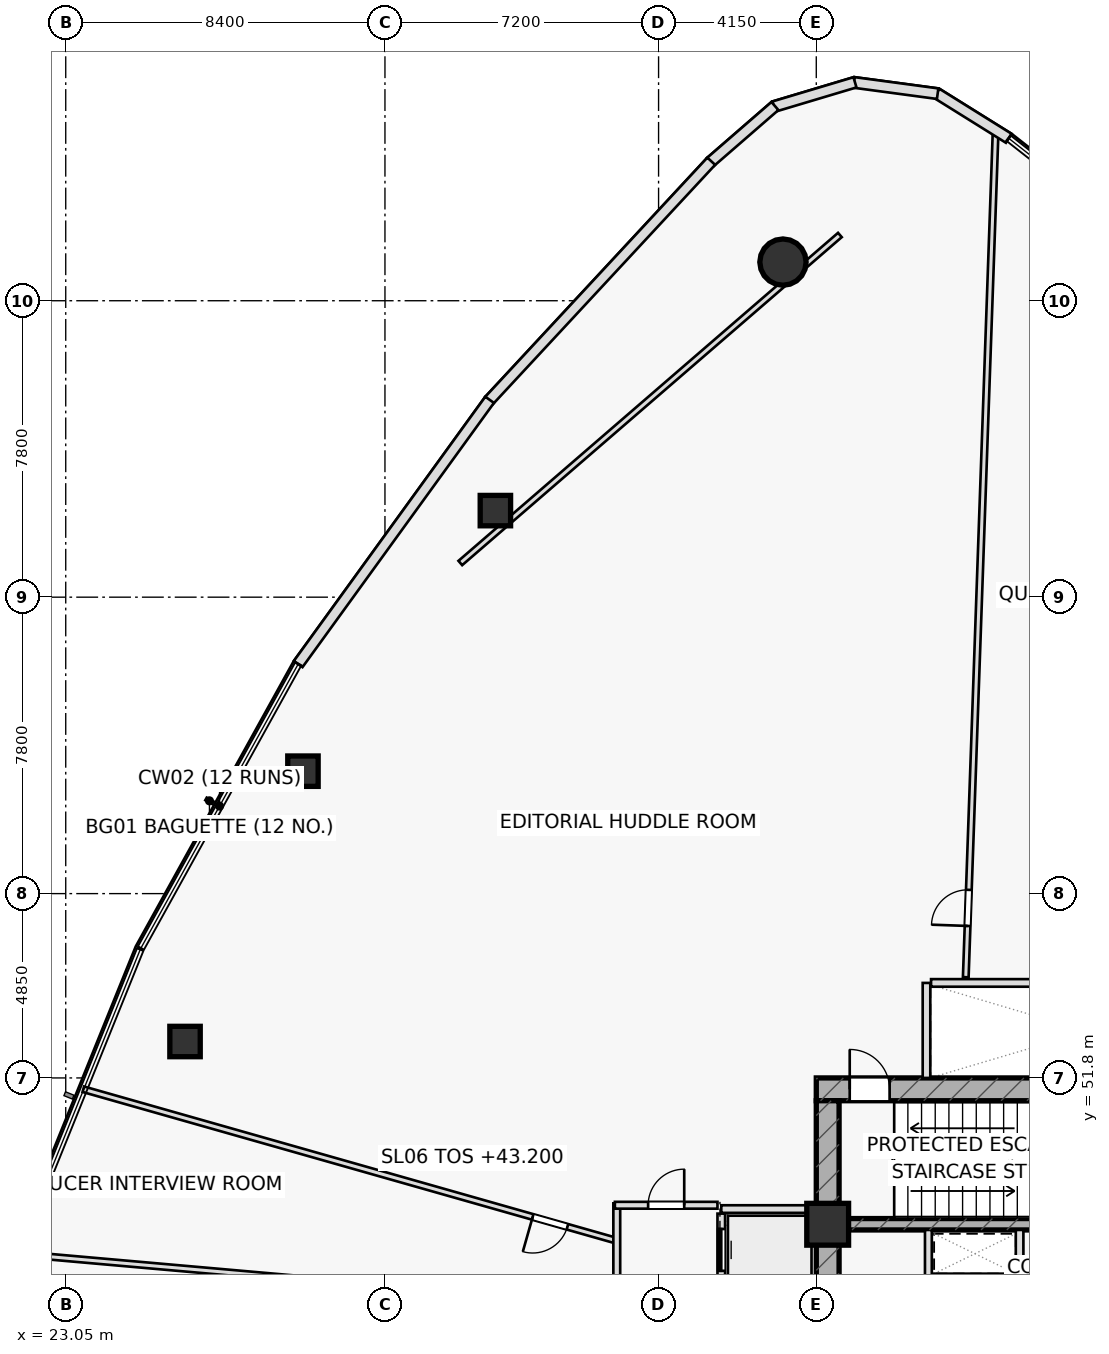
"""IFC4 building model, lengths in metres.
Left out: names, types, materials, properties, quantities, classifications, styles, units other than length and angle.
Written with IfcOpenShell. Run it as: python <this file> out.ifc"""

import sys

from ifc_helpers import new_model, si_unit, direction, frame, frame_2d, origin, origin_2d, place, context, subcontext, project, spatial, rectangle, hollow_rectangle, hollow_circle, extrude, element, fill, save


model = new_model("IFC4")
c1 = context("Model", 3, precision=1e-05, world=origin(), true_north=direction((0.0, 1.0)))
c2 = subcontext(c1, "Body", "Model", "MODEL_VIEW")
j1 = project(units=[si_unit("LENGTHUNIT", "METRE"), si_unit("PLANEANGLEUNIT", "RADIAN")], contexts=[c1])
p1 = place(None, origin())
s1 = spatial("IfcSite", under=j1, at=p1, CompositionType="ELEMENT")
p2 = place(p1, origin())
s2 = spatial("IfcBuilding", under=s1, at=p2, CompositionType="ELEMENT")
p3 = place(p2, frame((0.0, 0.0, 43.2)))
s3 = spatial("IfcBuildingStorey", under=s2, at=p3, CompositionType="ELEMENT", Elevation=43.2)
p4 = place(p3, frame((42.8, 51.5, 0.0), z_axis=(0.0, 0.0, 1.0), x_axis=(1.0, 0.0, 0.0)))
e1 = element("IfcWall", 1, at=p4, inside=s3, PredefinedType="SHEAR", context=c2, shape_type="SweptSolid", body=[
    extrude(rectangle(XDim=14.4, YDim=0.6, at=frame_2d((7.2, 0.0))), origin(), (0.0, 0.0, 1.0), 3.6),
])
p5 = place(p4, frame((0.88, 0.0, 0.0)))
e2 = element("IfcOpeningElement", 2, at=p5, cuts=e1, PredefinedType="OPENING", context=c2, shape_type="SweptSolid", body=[
    extrude(rectangle(XDim=1.05, YDim=2.2, at=frame_2d((0.525, 1.1))), frame((0.0, 0.31, 0.0), z_axis=(0.0, -1.0, 0.0), x_axis=(1.0, 0.0, 0.0)), (0.0, 0.0, 1.0), 0.62),
])
p6 = place(p3, frame((43.1, 38.8, 0.0), z_axis=(0.0, 0.0, 1.0), x_axis=(0.0, 1.0, 0.0)))
e3 = element("IfcWall", 3, at=p6, inside=s3, PredefinedType="SHEAR", context=c2, shape_type="SweptSolid", body=[
    extrude(rectangle(XDim=12.4, YDim=0.6, at=frame_2d((6.2, 0.0))), origin(), (0.0, 0.0, 1.0), 3.6),
])
p7 = place(p3, frame((43.4, 47.95, 0.0), z_axis=(0.0, 0.0, 1.0), x_axis=(1.0, 0.0, 0.0)))
e4 = element("IfcWall", 4, at=p7, inside=s3, PredefinedType="SHEAR", context=c2, shape_type="SweptSolid", body=[
    extrude(rectangle(XDim=13.2, YDim=0.3, at=frame_2d((6.6, 0.0))), origin(), (0.0, 0.0, 1.0), 3.6),
])
p8 = place(p7, frame((8.345, 0.0, 0.0)))
e5 = element("IfcOpeningElement", 5, at=p8, cuts=e4, PredefinedType="OPENING", context=c2, shape_type="SweptSolid", body=[
    extrude(rectangle(XDim=1.15, YDim=2.2, at=frame_2d((0.575, 1.1))), frame((0.0, 0.16, 0.0), z_axis=(0.0, -1.0, 0.0), x_axis=(1.0, 0.0, 0.0)), (0.0, 0.0, 1.0), 0.32),
])
p9 = place(p7, frame((10.065, 0.0, 0.0)))
e6 = element("IfcOpeningElement", 6, at=p9, cuts=e4, PredefinedType="OPENING", context=c2, shape_type="SweptSolid", body=[
    extrude(rectangle(XDim=1.15, YDim=2.2, at=frame_2d((0.575, 1.1))), frame((0.0, 0.16, 0.0), z_axis=(0.0, -1.0, 0.0), x_axis=(1.0, 0.0, 0.0)), (0.0, 0.0, 1.0), 0.32),
])
p10 = place(p7, frame((11.645, 0.0, 0.0)))
e7 = element("IfcOpeningElement", 7, at=p10, cuts=e4, PredefinedType="OPENING", context=c2, shape_type="SweptSolid", body=[
    extrude(rectangle(XDim=1.15, YDim=2.2, at=frame_2d((0.575, 1.1))), frame((0.0, 0.16, 0.0), z_axis=(0.0, -1.0, 0.0), x_axis=(1.0, 0.0, 0.0)), (0.0, 0.0, 1.0), 0.32),
])
p11 = place(p3, frame((43.1, 47.95, 0.0), z_axis=(0.0, 0.0, 1.0), x_axis=(1.0, 0.0, 0.0)))
e8 = element("IfcColumn", 8, at=p11, inside=s3, PredefinedType="COLUMN", context=c2, shape_type="SweptSolid", body=[
    extrude(rectangle(XDim=1.1, YDim=1.1, at=origin_2d()), origin(), (0.0, 0.0, 1.0), 3.6),
])
p12 = place(p3, frame((41.923, 73.266, 0.0), z_axis=(0.0, 0.0, 1.0), x_axis=(1.0, 0.0, 0.0)))
e9 = element("IfcColumn", 9, at=p12, inside=s3, PredefinedType="COLUMN", context=c2, shape_type="SweptSolid", body=[
    extrude(hollow_circle(Radius=0.61, WallThickness=0.05, at=origin_2d()), origin(), (0.0, 0.0, 1.0), 3.6),
])
for number, where, z_axis, x_axis in (
    (10, (34.356, 66.728, 0.0), (0.0, 0.0, 1.0), (1.0, 0.0, 0.0)),
    (11, (29.292, 59.872, 0.0), (0.0, 0.0, 1.0), (1.0, 0.0, 0.0)),
    (12, (26.189, 52.758, 0.0), (0.0, 0.0, 1.0), (1.0, 0.0, 0.0)),
):
    element("IfcColumn", number, at=place(p3, frame(where, z_axis=z_axis, x_axis=x_axis)), inside=s3, PredefinedType="COLUMN", context=c2, shape_type="SweptSolid", body=[
        extrude(hollow_rectangle(XDim=0.8, YDim=0.8, WallThickness=0.045, at=origin_2d()), origin(), (0.0, 0.0, 1.0), 3.6),
    ])
for number, where, z_axis, x_axis in (
    (13, (40.3, 48.35, 0.0), (0.0, 0.0, 1.0), (1.0, 0.0, 0.0)),
    (14, (45.7, 51.8, 0.0), (0.0, 0.0, 1.0), (0.0, 1.0, 0.0)),
):
    element("IfcWall", number, at=place(p3, frame(where, z_axis=z_axis, x_axis=x_axis)), inside=s3, PredefinedType="PARTITIONING", context=c2, shape_type="SweptSolid", body=[
        extrude(rectangle(XDim=2.5, YDim=0.2, at=frame_2d((1.25, 0.0))), origin(), (0.0, 0.0, 1.0), 3.6),
    ])
p13 = place(p3, frame((45.75, 46.55, 0.0), z_axis=(0.0, 0.0, 1.0), x_axis=(1.0, 0.0, 0.0)))
e15 = element("IfcWall", 15, at=p13, inside=s3, PredefinedType="PARTITIONING", context=c2, shape_type="SweptSolid", body=[
    extrude(rectangle(XDim=2.4, YDim=0.2, at=frame_2d((1.2, 0.0))), origin(), (0.0, 0.0, 1.0), 3.6),
])
p14 = place(p3, frame((48.15, 46.55, 0.0), z_axis=(0.0, 0.0, 1.0), x_axis=(0.0, 1.0, 0.0)))
e16 = element("IfcWall", 16, at=p14, inside=s3, PredefinedType="PARTITIONING", context=c2, shape_type="SweptSolid", body=[
    extrude(rectangle(XDim=1.25, YDim=0.2, at=frame_2d((0.625, 0.0))), origin(), (0.0, 0.0, 1.0), 3.6),
])
p15 = place(p3, frame((45.75, 42.2, 0.0), z_axis=(0.0, 0.0, 1.0), x_axis=(0.0, 1.0, 0.0)))
e17 = element("IfcWall", 17, at=p15, inside=s3, PredefinedType="PARTITIONING", context=c2, shape_type="SweptSolid", body=[
    extrude(rectangle(XDim=5.6, YDim=0.18, at=frame_2d((2.8, 0.0))), origin(), (0.0, 0.0, 1.0), 3.6),
])
p16 = place(p15, frame((0.42, 0.0, 0.0)))
e18 = element("IfcOpeningElement", 18, at=p16, cuts=e17, PredefinedType="OPENING", context=c2, shape_type="SweptSolid", body=[
    extrude(rectangle(XDim=0.85, YDim=2.05, at=frame_2d((0.425, 1.025))), frame((0.0, 0.1, 0.0), z_axis=(0.0, -1.0, 0.0), x_axis=(1.0, 0.0, 0.0)), (0.0, 0.0, 1.0), 0.2),
])
p17 = place(p15, frame((1.57, 0.0, 0.0)))
e19 = element("IfcOpeningElement", 19, at=p17, cuts=e17, PredefinedType="OPENING", context=c2, shape_type="SweptSolid", body=[
    extrude(rectangle(XDim=0.85, YDim=2.05, at=frame_2d((0.425, 1.025))), frame((0.0, 0.1, 0.0), z_axis=(0.0, -1.0, 0.0), x_axis=(1.0, 0.0, 0.0)), (0.0, 0.0, 1.0), 0.2),
])
p18 = place(p15, frame((2.8, 0.0, 0.0)))
e20 = element("IfcOpeningElement", 20, at=p18, cuts=e17, PredefinedType="OPENING", context=c2, shape_type="SweptSolid", body=[
    extrude(rectangle(XDim=0.9, YDim=2.05, at=frame_2d((0.45, 1.025))), frame((0.0, 0.1, 0.0), z_axis=(0.0, -1.0, 0.0), x_axis=(1.0, 0.0, 0.0)), (0.0, 0.0, 1.0), 0.2),
])
p19 = place(p3, frame((43.421, 73.979, 0.0), z_axis=(0.0, 0.0, 1.0), x_axis=(-0.756659135409, -0.653809569218, 0.0)))
e21 = element("IfcWall", 21, at=p19, inside=s3, PredefinedType="PARTITIONING", context=c2, shape_type="SweptSolid", body=[
    extrude(rectangle(XDim=13.2, YDim=0.15, at=frame_2d((6.6, 0.0))), origin(), (0.0, 0.0, 1.0), 2.925),
])
p20 = place(p3, frame((46.733, 54.45, 0.0), z_axis=(0.0, 0.0, 1.0), x_axis=(0.035284497106, 0.999377308259, 0.0)))
e22 = element("IfcWall", 22, at=p20, inside=s3, PredefinedType="PARTITIONING", context=c2, shape_type="SweptSolid", body=[
    extrude(rectangle(XDim=22.314, YDim=0.15, at=frame_2d((11.157, 0.0))), origin(), (0.0, 0.0, 1.0), 2.975),
])
p21 = place(p20, frame((1.35, 0.0, 0.0)))
e23 = element("IfcOpeningElement", 23, at=p21, cuts=e22, PredefinedType="OPENING", context=c2, shape_type="SweptSolid", body=[
    extrude(rectangle(XDim=0.95, YDim=2.05, at=frame_2d((0.475, 1.025))), frame((0.0, 0.085, 0.0), z_axis=(0.0, -1.0, 0.0), x_axis=(1.0, 0.0, 0.0)), (0.0, 0.0, 1.0), 0.17),
])
p22 = place(p3, frame((37.55, 47.514, 0.0), z_axis=(0.0, 0.0, 1.0), x_axis=(-0.961932608726, 0.273286765632, 0.0)))
e24 = element("IfcWall", 24, at=p22, inside=s3, PredefinedType="PARTITIONING", context=c2, shape_type="SweptSolid", body=[
    extrude(rectangle(XDim=14.593, YDim=0.15, at=frame_2d((7.296, 0.0))), origin(), (0.0, 0.0, 1.0), 2.925),
])
p23 = place(p22, frame((1.35, 0.0, 0.0)))
e25 = element("IfcOpeningElement", 25, at=p23, cuts=e24, PredefinedType="OPENING", context=c2, shape_type="SweptSolid", body=[
    extrude(rectangle(XDim=0.95, YDim=2.05, at=frame_2d((0.475, 1.025))), frame((0.0, 0.085, 0.0), z_axis=(0.0, -1.0, 0.0), x_axis=(1.0, 0.0, 0.0)), (0.0, 0.0, 1.0), 0.17),
])
p24 = place(p3, frame((37.55, 45.78, 0.0), z_axis=(0.0, 0.0, 1.0), x_axis=(-0.996136872502, 0.087814185882, 0.0)))
e26 = element("IfcWall", 26, at=p24, inside=s3, PredefinedType="PARTITIONING", context=c2, shape_type="SweptSolid", body=[
    extrude(rectangle(XDim=15.839, YDim=0.15, at=frame_2d((7.919, 0.0))), origin(), (0.0, 0.0, 1.0), 2.925),
])
p25 = place(p3, frame((37.55, 35.85, 0.0), z_axis=(0.0, 0.0, 1.0), x_axis=(0.0, 1.0, 0.0)))
e27 = element("IfcWall", 27, at=p25, inside=s3, PredefinedType="PARTITIONING", context=c2, shape_type="SweptSolid", body=[
    extrude(rectangle(XDim=12.65, YDim=0.18, at=frame_2d((6.325, 0.0))), origin(), (0.0, 0.0, 1.0), 2.925),
])
p26 = place(p25, frame((6.159, 0.0, 0.0)))
e28 = element("IfcOpeningElement", 28, at=p26, cuts=e27, PredefinedType="OPENING", context=c2, shape_type="SweptSolid", body=[
    extrude(rectangle(XDim=0.95, YDim=2.05, at=frame_2d((0.475, 1.025))), frame((0.0, 0.1, 0.0), z_axis=(0.0, -1.0, 0.0), x_axis=(1.0, 0.0, 0.0)), (0.0, 0.0, 1.0), 0.2),
])
p27 = place(p3, frame((37.5, 48.45, 0.0), z_axis=(0.0, 0.0, 1.0), x_axis=(1.0, 0.0, 0.0)))
e29 = element("IfcWall", 29, at=p27, inside=s3, PredefinedType="PARTITIONING", context=c2, shape_type="SweptSolid", body=[
    extrude(rectangle(XDim=2.7, YDim=0.18, at=frame_2d((1.35, 0.0))), origin(), (0.0, 0.0, 1.0), 3.6),
])
p28 = place(p27, frame((0.875, 0.0, 0.0)))
e30 = element("IfcOpeningElement", 30, at=p28, cuts=e29, PredefinedType="OPENING", context=c2, shape_type="SweptSolid", body=[
    extrude(rectangle(XDim=0.95, YDim=2.05, at=frame_2d((0.475, 1.025))), frame((0.0, 0.1, 0.0), z_axis=(0.0, -1.0, 0.0), x_axis=(1.0, 0.0, 0.0)), (0.0, 0.0, 1.0), 0.2),
])
p29 = place(p3, frame((47.864, 76.524, 0.0), z_axis=(0.0, 0.0, 1.0), x_axis=(-0.848494667363, 0.529203929934, 0.0)))
e31 = element("IfcWall", 31, at=p29, inside=s3, PredefinedType="STANDARD", context=c2, shape_type="SweptSolid", body=[
    extrude(rectangle(XDim=2.237, YDim=0.28, at=frame_2d((1.118, 0.0))), origin(), (0.0, 0.0, 1.0), 3.6),
])
for number, where, z_axis, x_axis in (
    (32, (45.994, 77.698, 0.0), (0.0, 0.0, 1.0), (-0.991, 0.133, 0.0)),
    (33, (43.818, 77.997, 0.0), (0.0, 0.0, 1.0), (-0.958, -0.287, 0.0)),
):
    element("IfcWall", number, at=place(p3, frame(where, z_axis=z_axis, x_axis=x_axis)), inside=s3, PredefinedType="STANDARD", context=c2, shape_type="SweptSolid", body=[
        extrude(rectangle(XDim=2.225, YDim=0.28, at=frame_2d((1.113, 0.0))), origin(), (0.0, 0.0, 1.0), 3.6),
    ])
p30 = place(p3, frame((41.712, 77.373, 0.0), z_axis=(0.0, 0.0, 1.0), x_axis=(-0.755355676043, -0.655315040778, 0.0)))
e34 = element("IfcWall", 34, at=p30, inside=s3, PredefinedType="STANDARD", context=c2, shape_type="SweptSolid", body=[
    extrude(rectangle(XDim=2.248, YDim=0.28, at=frame_2d((1.124, 0.0))), origin(), (0.0, 0.0, 1.0), 3.6),
])
p31 = place(p3, frame((40.036, 75.921, 0.0), z_axis=(0.0, 0.0, 1.0), x_axis=(-0.68044238653, -0.732801582022, 0.0)))
e35 = element("IfcWall", 35, at=p31, inside=s3, PredefinedType="STANDARD", context=c2, shape_type="SweptSolid", body=[
    extrude(rectangle(XDim=8.598, YDim=0.28, at=frame_2d((4.299, 0.0))), origin(), (0.0, 0.0, 1.0), 3.6),
])
p32 = place(p3, frame((34.204, 69.643, 0.0), z_axis=(0.0, 0.0, 1.0), x_axis=(-0.586738770154, -0.809776275028, 0.0)))
e36 = element("IfcWall", 36, at=p32, inside=s3, PredefinedType="STANDARD", context=c2, shape_type="SweptSolid", body=[
    extrude(rectangle(XDim=8.586, YDim=0.28, at=frame_2d((4.293, 0.0))), origin(), (0.0, 0.0, 1.0), 3.6),
])
p33 = place(p3, frame((40.3, 40.02, 0.0), z_axis=(0.0, 0.0, 1.0), x_axis=(0.0, 1.0, 0.0)))
e37 = element("IfcWall", 37, at=p33, inside=s3, PredefinedType="PARTITIONING", context=c2, shape_type="SweptSolid", body=[
    extrude(rectangle(XDim=8.21, YDim=0.2, at=frame_2d((4.105, 0.0))), origin(), (0.0, 0.0, 1.0), 3.6),
])
p34 = place(p33, frame((0.405, 0.0, 0.0)))
e38 = element("IfcOpeningElement", 38, at=p34, cuts=e37, PredefinedType="OPENING", context=c2, shape_type="SweptSolid", body=[
    extrude(rectangle(XDim=1.1, YDim=2.15, at=frame_2d((0.55, 1.075))), frame((0.0, 0.11, 0.0), z_axis=(0.0, -1.0, 0.0), x_axis=(1.0, 0.0, 0.0)), (0.0, 0.0, 1.0), 0.22),
])
p35 = place(p33, frame((2.505, 0.0, 0.0)))
e39 = element("IfcOpeningElement", 39, at=p35, cuts=e37, PredefinedType="OPENING", context=c2, shape_type="SweptSolid", body=[
    extrude(rectangle(XDim=1.1, YDim=2.15, at=frame_2d((0.55, 1.075))), frame((0.0, 0.11, 0.0), z_axis=(0.0, -1.0, 0.0), x_axis=(1.0, 0.0, 0.0)), (0.0, 0.0, 1.0), 0.22),
])
p36 = place(p33, frame((4.605, 0.0, 0.0)))
e40 = element("IfcOpeningElement", 40, at=p36, cuts=e37, PredefinedType="OPENING", context=c2, shape_type="SweptSolid", body=[
    extrude(rectangle(XDim=1.1, YDim=2.15, at=frame_2d((0.55, 1.075))), frame((0.0, 0.11, 0.0), z_axis=(0.0, -1.0, 0.0), x_axis=(1.0, 0.0, 0.0)), (0.0, 0.0, 1.0), 0.22),
])
p37 = place(p33, frame((6.705, 0.0, 0.0)))
e41 = element("IfcOpeningElement", 41, at=p37, cuts=e37, PredefinedType="OPENING", context=c2, shape_type="SweptSolid", body=[
    extrude(rectangle(XDim=1.1, YDim=2.15, at=frame_2d((0.55, 1.075))), frame((0.0, 0.11, 0.0), z_axis=(0.0, -1.0, 0.0), x_axis=(1.0, 0.0, 0.0)), (0.0, 0.0, 1.0), 0.22),
])
p38 = place(p3, frame((45.82, 54.3, 0.0), z_axis=(0.0, 0.0, 1.0), x_axis=(1.0, 0.0, 0.0)))
e42 = element("IfcWall", 42, at=p38, inside=s3, PredefinedType="PARTITIONING", context=c2, shape_type="SweptSolid", body=[
    extrude(rectangle(XDim=8.31, YDim=0.2, at=frame_2d((4.155, 0.0))), origin(), (0.0, 0.0, 1.0), 3.6),
])
p39 = place(p5, origin())
e43 = element("IfcDoor", 43, at=p39, inside=s3, OperationType="SINGLE_SWING_LEFT", PredefinedType="DOOR", context=c2, shape_type="SweptSolid", body=[
    extrude(rectangle(XDim=1.05, YDim=2.2, at=frame_2d((0.525, 1.1))), frame((0.0, 0.025, 0.0), z_axis=(0.0, -1.0, 0.0), x_axis=(1.0, 0.0, 0.0)), (0.0, 0.0, 1.0), 0.05),
])
fill(e2, e43)
p40 = place(p21, origin())
e44 = element("IfcDoor", 44, at=p40, inside=s3, OperationType="SINGLE_SWING_LEFT", PredefinedType="DOOR", context=c2, shape_type="SweptSolid", body=[
    extrude(rectangle(XDim=0.95, YDim=2.05, at=frame_2d((0.475, 1.025))), frame((0.0, 0.025, 0.0), z_axis=(0.0, -1.0, 0.0), x_axis=(1.0, 0.0, 0.0)), (0.0, 0.0, 1.0), 0.05),
])
fill(e23, e44)
p41 = place(p23, origin())
e45 = element("IfcDoor", 45, at=p41, inside=s3, OperationType="SINGLE_SWING_RIGHT", PredefinedType="DOOR", context=c2, shape_type="SweptSolid", body=[
    extrude(rectangle(XDim=0.95, YDim=2.05, at=frame_2d((0.475, 1.025))), frame((0.0, 0.025, 0.0), z_axis=(0.0, -1.0, 0.0), x_axis=(1.0, 0.0, 0.0)), (0.0, 0.0, 1.0), 0.05),
])
fill(e25, e45)
p42 = place(p28, origin())
e46 = element("IfcDoor", 46, at=p42, inside=s3, OperationType="SINGLE_SWING_RIGHT", PredefinedType="DOOR", context=c2, shape_type="SweptSolid", body=[
    extrude(rectangle(XDim=0.95, YDim=2.05, at=frame_2d((0.475, 1.025))), frame((0.0, 0.025, 0.0), z_axis=(0.0, -1.0, 0.0), x_axis=(1.0, 0.0, 0.0)), (0.0, 0.0, 1.0), 0.05),
])
fill(e30, e46)
p43 = place(p37, origin())
e47 = element("IfcDoor", 47, at=p43, inside=s3, OperationType="SLIDING_TO_RIGHT", PredefinedType="DOOR", context=c2, shape_type="SweptSolid", body=[
    extrude(rectangle(XDim=1.1, YDim=2.15, at=frame_2d((0.55, 1.075))), frame((0.0, 0.025, 0.0), z_axis=(0.0, -1.0, 0.0), x_axis=(1.0, 0.0, 0.0)), (0.0, 0.0, 1.0), 0.05),
])
fill(e41, e47)
save(model, sys.argv[1])
